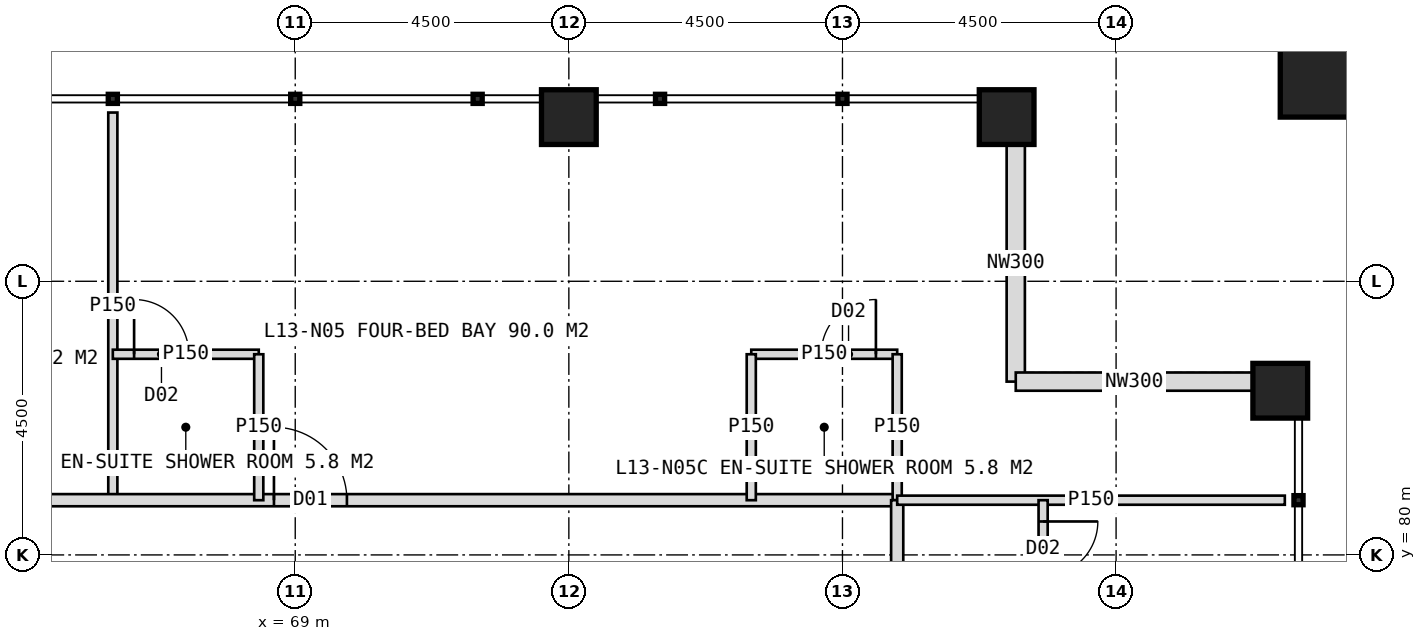
"""IFC4 building model, lengths in metres.
Left out: names, types, materials, properties, quantities, classifications, styles, units other than length and angle.
Written with IfcOpenShell. Run it as: python <this file> out.ifc"""

import sys

from ifc_helpers import new_model, si_unit, direction, frame, frame_2d, origin, origin_2d, place, context, subcontext, project, spatial, rectangle, hollow_rectangle, extrude, element, fill, save


model = new_model("IFC4")
c1 = context("Model", 3, precision=1e-05, world=origin(), true_north=direction((0.0, 1.0)))
c2 = subcontext(c1, "Body", "Model", "MODEL_VIEW")
j1 = project(units=[si_unit("LENGTHUNIT", "METRE"), si_unit("PLANEANGLEUNIT", "RADIAN")], contexts=[c1])
p1 = place(None, origin())
s1 = spatial("IfcSite", under=j1, at=p1, CompositionType="ELEMENT")
p2 = place(p1, origin())
s2 = spatial("IfcBuilding", under=s1, at=p2, CompositionType="ELEMENT")
p3 = place(p2, frame((0.0, 0.0, 59.0)))
s3 = spatial("IfcBuildingStorey", under=s2, at=p3, CompositionType="ELEMENT", Elevation=59.0)
for number, where, z_axis, x_axis in (
    (1, (73.5, 87.2, 0.0), (0.0, 0.0, 1.0), (1.0, 0.0, 0.0)),
    (2, (80.7, 87.2, 0.0), (0.0, 0.0, 1.0), (1.0, 0.0, 0.0)),
    (3, (85.2, 82.7, 0.0), (0.0, 0.0, 1.0), (1.0, 0.0, 0.0)),
):
    element("IfcColumn", number, at=place(p3, frame(where, z_axis=z_axis, x_axis=x_axis)), inside=s3, PredefinedType="COLUMN", context=c2, shape_type="SweptSolid", body=[
        extrude(hollow_rectangle(XDim=0.9, YDim=0.9, WallThickness=0.08, at=origin_2d()), origin(), (0.0, 0.0, 1.0), 4.0),
    ])
p4 = place(p3, frame((86.1, 88.1, 0.0), z_axis=(0.0, 0.0, 1.0), x_axis=(1.0, 0.0, 0.0)))
e4 = element("IfcColumn", 4, at=p4, inside=s3, PredefinedType="COLUMN", context=c2, shape_type="SweptSolid", body=[
    extrude(hollow_rectangle(XDim=1.8, YDim=1.8, WallThickness=0.1, at=origin_2d()), origin(), (0.0, 0.0, 1.0), 4.0),
])
for number, where, z_axis, x_axis in (
    (5, (80.85, 86.75, 0.0), (0.0, 0.0, 1.0), (0.0, -1.0, 0.0)),
    (6, (80.85, 82.85, 0.0), (0.0, 0.0, 1.0), (1.0, 0.0, 0.0)),
):
    element("IfcWall", number, at=place(p3, frame(where, z_axis=z_axis, x_axis=x_axis)), inside=s3, PredefinedType="ELEMENTEDWALL", context=c2, shape_type="SweptSolid", body=[
        extrude(rectangle(XDim=3.9, YDim=0.3, at=frame_2d((1.95, 0.0))), origin(), (0.0, 0.0, 1.0), 2.95),
    ])
p5 = place(p3, frame((66.0, 80.9, 0.0), z_axis=(0.0, 0.0, 1.0), x_axis=(0.0, 1.0, 0.0)))
e7 = element("IfcWall", 7, at=p5, inside=s3, PredefinedType="PARTITIONING", context=c2, shape_type="SweptSolid", body=[
    extrude(rectangle(XDim=6.375, YDim=0.15, at=frame_2d((3.188, 0.0))), origin(), (0.0, 0.0, 1.0), 3.75),
])
p6 = place(p3, frame((41.1, 80.9, 0.0), z_axis=(0.0, 0.0, 1.0), x_axis=(1.0, 0.0, 0.0)))
e8 = element("IfcWall", 8, at=p6, inside=s3, PredefinedType="PARTITIONING", context=c2, shape_type="SweptSolid", body=[
    extrude(rectangle(XDim=37.8, YDim=0.2, at=frame_2d((18.9, 0.0))), origin(), (0.0, 0.0, 1.0), 3.75),
])
p7 = place(p6, frame((3.25, 0.0, 0.0)))
e9 = element("IfcOpeningElement", 9, at=p7, cuts=e8, PredefinedType="OPENING", context=c2, shape_type="SweptSolid", body=[
    extrude(rectangle(XDim=1.2, YDim=2.2, at=frame_2d((0.6, 1.1))), frame((0.0, 0.11, 0.0), z_axis=(0.0, -1.0, 0.0), x_axis=(1.0, 0.0, 0.0)), (0.0, 0.0, 1.0), 0.22),
])
p8 = place(p6, frame((9.55, 0.0, 0.0)))
e10 = element("IfcOpeningElement", 10, at=p8, cuts=e8, PredefinedType="OPENING", context=c2, shape_type="SweptSolid", body=[
    extrude(rectangle(XDim=1.2, YDim=2.2, at=frame_2d((0.6, 1.1))), frame((0.0, 0.11, 0.0), z_axis=(0.0, -1.0, 0.0), x_axis=(1.0, 0.0, 0.0)), (0.0, 0.0, 1.0), 0.22),
])
p9 = place(p6, frame((15.55, 0.0, 0.0)))
e11 = element("IfcOpeningElement", 11, at=p9, cuts=e8, PredefinedType="OPENING", context=c2, shape_type="SweptSolid", body=[
    extrude(rectangle(XDim=1.2, YDim=2.2, at=frame_2d((0.6, 1.1))), frame((0.0, 0.11, 0.0), z_axis=(0.0, -1.0, 0.0), x_axis=(1.0, 0.0, 0.0)), (0.0, 0.0, 1.0), 0.22),
])
p10 = place(p6, frame((21.4, 0.0, 0.0)))
e12 = element("IfcOpeningElement", 12, at=p10, cuts=e8, PredefinedType="OPENING", context=c2, shape_type="SweptSolid", body=[
    extrude(rectangle(XDim=1.0, YDim=2.1, at=frame_2d((0.5, 1.05))), frame((0.0, 0.11, 0.0), z_axis=(0.0, -1.0, 0.0), x_axis=(1.0, 0.0, 0.0)), (0.0, 0.0, 1.0), 0.22),
])
p11 = place(p6, frame((27.55, 0.0, 0.0)))
e13 = element("IfcOpeningElement", 13, at=p11, cuts=e8, PredefinedType="OPENING", context=c2, shape_type="SweptSolid", body=[
    extrude(rectangle(XDim=1.2, YDim=2.2, at=frame_2d((0.6, 1.1))), frame((0.0, 0.11, 0.0), z_axis=(0.0, -1.0, 0.0), x_axis=(1.0, 0.0, 0.0)), (0.0, 0.0, 1.0), 0.22),
])
p12 = place(p3, frame((66.0, 83.3, 0.0), z_axis=(0.0, 0.0, 1.0), x_axis=(1.0, 0.0, 0.0)))
e14 = element("IfcWall", 14, at=p12, inside=s3, PredefinedType="PARTITIONING", context=c2, shape_type="SweptSolid", body=[
    extrude(rectangle(XDim=2.4, YDim=0.15, at=frame_2d((1.2, 0.0))), origin(), (0.0, 0.0, 1.0), 3.75),
])
p13 = place(p12, frame((0.35, 0.0, 0.0)))
e15 = element("IfcOpeningElement", 15, at=p13, cuts=e14, PredefinedType="OPENING", context=c2, shape_type="SweptSolid", body=[
    extrude(rectangle(XDim=0.9, YDim=2.1, at=frame_2d((0.45, 1.05))), frame((0.0, 0.085, 0.0), z_axis=(0.0, -1.0, 0.0), x_axis=(1.0, 0.0, 0.0)), (0.0, 0.0, 1.0), 0.17),
])
p14 = place(p3, frame((68.4, 80.9, 0.0), z_axis=(0.0, 0.0, 1.0), x_axis=(0.0, 1.0, 0.0)))
e16 = element("IfcWall", 16, at=p14, inside=s3, PredefinedType="PARTITIONING", context=c2, shape_type="SweptSolid", body=[
    extrude(rectangle(XDim=2.4, YDim=0.15, at=frame_2d((1.2, 0.0))), origin(), (0.0, 0.0, 1.0), 3.75),
])
p15 = place(p3, frame((76.5, 83.3, 0.0), z_axis=(0.0, 0.0, 1.0), x_axis=(1.0, 0.0, 0.0)))
e17 = element("IfcWall", 17, at=p15, inside=s3, PredefinedType="PARTITIONING", context=c2, shape_type="SweptSolid", body=[
    extrude(rectangle(XDim=2.4, YDim=0.15, at=frame_2d((1.2, 0.0))), origin(), (0.0, 0.0, 1.0), 3.75),
])
p16 = place(p15, frame((1.15, 0.0, 0.0)))
e18 = element("IfcOpeningElement", 18, at=p16, cuts=e17, PredefinedType="OPENING", context=c2, shape_type="SweptSolid", body=[
    extrude(rectangle(XDim=0.9, YDim=2.1, at=frame_2d((0.45, 1.05))), frame((0.0, 0.085, 0.0), z_axis=(0.0, -1.0, 0.0), x_axis=(1.0, 0.0, 0.0)), (0.0, 0.0, 1.0), 0.17),
])
for number, where, z_axis, x_axis in (
    (19, (76.5, 80.9, 0.0), (0.0, 0.0, 1.0), (0.0, 1.0, 0.0)),
    (20, (78.9, 80.9, 0.0), (0.0, 0.0, 1.0), (0.0, 1.0, 0.0)),
):
    element("IfcWall", number, at=place(p3, frame(where, z_axis=z_axis, x_axis=x_axis)), inside=s3, PredefinedType="PARTITIONING", context=c2, shape_type="SweptSolid", body=[
        extrude(rectangle(XDim=2.4, YDim=0.15, at=frame_2d((1.2, 0.0))), origin(), (0.0, 0.0, 1.0), 3.75),
    ])
p17 = place(p3, frame((78.9, 80.9, 0.0), z_axis=(0.0, 0.0, 1.0), x_axis=(0.0, -1.0, 0.0)))
e21 = element("IfcWall", 21, at=p17, inside=s3, PredefinedType="PARTITIONING", context=c2, shape_type="SweptSolid", body=[
    extrude(rectangle(XDim=37.8, YDim=0.2, at=frame_2d((18.9, 0.0))), origin(), (0.0, 0.0, 1.0), 3.75),
])
p18 = place(p17, frame((3.25, 0.0, 0.0)))
e22 = element("IfcOpeningElement", 22, at=p18, cuts=e21, PredefinedType="OPENING", context=c2, shape_type="SweptSolid", body=[
    extrude(rectangle(XDim=1.2, YDim=2.2, at=frame_2d((0.6, 1.1))), frame((0.0, 0.11, 0.0), z_axis=(0.0, -1.0, 0.0), x_axis=(1.0, 0.0, 0.0)), (0.0, 0.0, 1.0), 0.22),
])
p19 = place(p17, frame((9.55, 0.0, 0.0)))
e23 = element("IfcOpeningElement", 23, at=p19, cuts=e21, PredefinedType="OPENING", context=c2, shape_type="SweptSolid", body=[
    extrude(rectangle(XDim=1.2, YDim=2.2, at=frame_2d((0.6, 1.1))), frame((0.0, 0.11, 0.0), z_axis=(0.0, -1.0, 0.0), x_axis=(1.0, 0.0, 0.0)), (0.0, 0.0, 1.0), 0.22),
])
p20 = place(p17, frame((15.55, 0.0, 0.0)))
e24 = element("IfcOpeningElement", 24, at=p20, cuts=e21, PredefinedType="OPENING", context=c2, shape_type="SweptSolid", body=[
    extrude(rectangle(XDim=1.2, YDim=2.2, at=frame_2d((0.6, 1.1))), frame((0.0, 0.11, 0.0), z_axis=(0.0, -1.0, 0.0), x_axis=(1.0, 0.0, 0.0)), (0.0, 0.0, 1.0), 0.22),
])
p21 = place(p17, frame((21.55, 0.0, 0.0)))
e25 = element("IfcOpeningElement", 25, at=p21, cuts=e21, PredefinedType="OPENING", context=c2, shape_type="SweptSolid", body=[
    extrude(rectangle(XDim=1.2, YDim=2.2, at=frame_2d((0.6, 1.1))), frame((0.0, 0.11, 0.0), z_axis=(0.0, -1.0, 0.0), x_axis=(1.0, 0.0, 0.0)), (0.0, 0.0, 1.0), 0.22),
])
p22 = place(p17, frame((30.55, 0.0, 0.0)))
e26 = element("IfcOpeningElement", 26, at=p22, cuts=e21, PredefinedType="OPENING", context=c2, shape_type="SweptSolid", body=[
    extrude(rectangle(XDim=1.2, YDim=2.2, at=frame_2d((0.6, 1.1))), frame((0.0, 0.11, 0.0), z_axis=(0.0, -1.0, 0.0), x_axis=(1.0, 0.0, 0.0)), (0.0, 0.0, 1.0), 0.22),
])
p23 = place(p3, frame((78.9, 80.9, 0.0), z_axis=(0.0, 0.0, 1.0), x_axis=(1.0, 0.0, 0.0)))
e27 = element("IfcWall", 27, at=p23, inside=s3, PredefinedType="PARTITIONING", context=c2, shape_type="SweptSolid", body=[
    extrude(rectangle(XDim=6.375, YDim=0.15, at=frame_2d((3.188, 0.0))), origin(), (0.0, 0.0, 1.0), 3.75),
])
p24 = place(p3, frame((81.3, 80.9, 0.0), z_axis=(0.0, 0.0, 1.0), x_axis=(0.0, -1.0, 0.0)))
e28 = element("IfcWall", 28, at=p24, inside=s3, PredefinedType="PARTITIONING", context=c2, shape_type="SweptSolid", body=[
    extrude(rectangle(XDim=3.0, YDim=0.15, at=frame_2d((1.5, 0.0))), origin(), (0.0, 0.0, 1.0), 3.75),
])
p25 = place(p24, frame((0.35, 0.0, 0.0)))
e29 = element("IfcOpeningElement", 29, at=p25, cuts=e28, PredefinedType="OPENING", context=c2, shape_type="SweptSolid", body=[
    extrude(rectangle(XDim=0.9, YDim=2.1, at=frame_2d((0.45, 1.05))), frame((0.0, 0.085, 0.0), z_axis=(0.0, -1.0, 0.0), x_axis=(1.0, 0.0, 0.0)), (0.0, 0.0, 1.0), 0.17),
])
p26 = place(p11, origin())
e30 = element("IfcDoor", 30, at=p26, inside=s3, OperationType="SINGLE_SWING_LEFT", PredefinedType="DOOR", context=c2, shape_type="SweptSolid", body=[
    extrude(rectangle(XDim=1.2, YDim=2.2, at=frame_2d((0.6, 1.1))), frame((0.0, 0.025, 0.0), z_axis=(0.0, -1.0, 0.0), x_axis=(1.0, 0.0, 0.0)), (0.0, 0.0, 1.0), 0.05),
])
fill(e13, e30)
p27 = place(p13, origin())
e31 = element("IfcDoor", 31, at=p27, inside=s3, OperationType="SINGLE_SWING_LEFT", PredefinedType="DOOR", context=c2, shape_type="SweptSolid", body=[
    extrude(rectangle(XDim=0.9, YDim=2.1, at=frame_2d((0.45, 1.05))), frame((0.0, 0.025, 0.0), z_axis=(0.0, -1.0, 0.0), x_axis=(1.0, 0.0, 0.0)), (0.0, 0.0, 1.0), 0.05),
])
fill(e15, e31)
p28 = place(p16, origin())
e32 = element("IfcDoor", 32, at=p28, inside=s3, OperationType="SINGLE_SWING_RIGHT", PredefinedType="DOOR", context=c2, shape_type="SweptSolid", body=[
    extrude(rectangle(XDim=0.9, YDim=2.1, at=frame_2d((0.45, 1.05))), frame((0.0, 0.025, 0.0), z_axis=(0.0, -1.0, 0.0), x_axis=(1.0, 0.0, 0.0)), (0.0, 0.0, 1.0), 0.05),
])
fill(e18, e32)
p29 = place(p25, origin())
e33 = element("IfcDoor", 33, at=p29, inside=s3, OperationType="SINGLE_SWING_LEFT", PredefinedType="DOOR", context=c2, shape_type="SweptSolid", body=[
    extrude(rectangle(XDim=0.9, YDim=2.1, at=frame_2d((0.45, 1.05))), frame((0.0, 0.025, 0.0), z_axis=(0.0, -1.0, 0.0), x_axis=(1.0, 0.0, 0.0)), (0.0, 0.0, 1.0), 0.05),
])
fill(e29, e33)
save(model, sys.argv[1])
